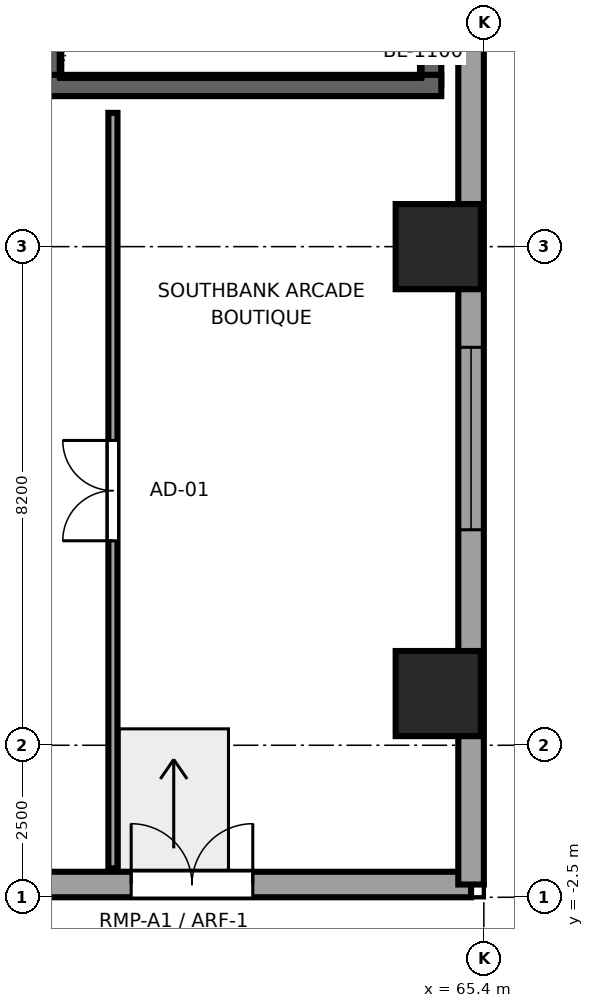
"""IFC4 building model, lengths in metres.
Left out: names, types, materials, properties, quantities, classifications, styles, units other than length and angle.
Written with IfcOpenShell. Run it as: python <this file> out.ifc"""

import sys

from ifc_helpers import new_model, si_unit, direction, frame, frame_2d, origin, origin_2d, place, context, subcontext, project, spatial, rectangle, extrude, source, transform, mapped, element, fill, save


model = new_model("IFC4")
c1 = context("Model", 3, precision=1e-05, world=origin(), true_north=direction((0.0, 1.0)))
c2 = subcontext(c1, "Body", "Model", "MODEL_VIEW")
j1 = project(units=[si_unit("LENGTHUNIT", "METRE"), si_unit("PLANEANGLEUNIT", "RADIAN")], contexts=[c1])
p1 = place(None, origin())
s1 = spatial("IfcSite", under=j1, at=p1, CompositionType="ELEMENT")
p2 = place(p1, origin())
s2 = spatial("IfcBuilding", under=s1, at=p2, CompositionType="ELEMENT")
p3 = place(p2, origin())
s3 = spatial("IfcBuildingStorey", under=s2, at=p3, CompositionType="ELEMENT", Elevation=0.0)
for number, where, z_axis, x_axis in (
    (1, (58.275, 10.85, 0.0), (0.0, 0.0, 1.0), (0.0, 1.0, 0.0)),
    (2, (64.525, 10.85, 0.0), (0.0, 0.0, 1.0), (0.0, 1.0, 0.0)),
):
    element("IfcWall", number, at=place(p3, frame(where, z_axis=z_axis, x_axis=x_axis)), inside=s3, PredefinedType="SHEAR", context=c2, shape_type="SweptSolid", body=[
        extrude(rectangle(XDim=29.0, YDim=0.35, at=frame_2d((14.5, 0.0))), origin(), (0.0, 0.0, 1.0), 1.25),
    ])
p4 = place(p3, frame((58.1, 10.85, 0.0), z_axis=(0.0, 0.0, 1.0), x_axis=(1.0, 0.0, 0.0)))
e3 = element("IfcWall", 3, at=p4, inside=s3, PredefinedType="SHEAR", context=c2, shape_type="SweptSolid", body=[
    extrude(rectangle(XDim=6.6, YDim=0.35, at=frame_2d((3.3, 0.0))), origin(), (0.0, 0.0, 1.0), 1.25),
])
m1 = source(origin(), c2, "Body", "SweptSolid", [
    extrude(rectangle(XDim=1.4, YDim=1.4, at=origin_2d()), origin(), (0.0, 0.0, 1.0), 6.0),
])
for number, where, z_axis, x_axis in (
    (4, (64.65, 0.85, 0.0), (0.0, 0.0, 1.0), (1.0, 0.0, 0.0)),
    (5, (64.65, 8.2, 0.0), (0.0, 0.0, 1.0), (1.0, 0.0, 0.0)),
):
    element("IfcColumn", number, at=place(p3, frame(where, z_axis=z_axis, x_axis=x_axis)), inside=s3, PredefinedType="COLUMN", context=c2, shape_type="MappedRepresentation", body=[
        mapped(m1, transform((0.0, 0.0, 0.0), x_axis=(1.0, 0.0, 0.0), y_axis=(0.0, 1.0, 0.0), z_axis=(0.0, 0.0, 1.0), scale=1.0)),
    ])
p5 = place(p3, frame((37.59, -2.29, 0.0), z_axis=(0.0, 0.0, 1.0), x_axis=(1.0, 0.0, 0.0)))
e6 = element("IfcWall", 6, at=p5, inside=s3, PredefinedType="SOLIDWALL", context=c2, shape_type="SweptSolid", body=[
    extrude(rectangle(XDim=27.6, YDim=0.42, at=frame_2d((13.8, 0.0))), origin(), (0.0, 0.0, 1.0), 5.74),
])
p6 = place(p5, frame((6.11, 0.0, 0.0), z_axis=(0.0, 0.0, 1.0), x_axis=(-1.0, 0.0, 0.0)))
e7 = element("IfcOpeningElement", 7, at=p6, cuts=e6, PredefinedType="OPENING", context=c2, shape_type="SweptSolid", body=[
    extrude(rectangle(XDim=2.0, YDim=2.25, at=frame_2d((1.0, 1.125))), frame((0.0, 0.22, 0.0), z_axis=(0.0, -1.0, 0.0), x_axis=(1.0, 0.0, 0.0)), (0.0, 0.0, 1.0), 0.44),
])
p7 = place(p5, frame((15.21, 0.0, 0.0), z_axis=(0.0, 0.0, 1.0), x_axis=(-1.0, 0.0, 0.0)))
e8 = element("IfcOpeningElement", 8, at=p7, cuts=e6, PredefinedType="OPENING", context=c2, shape_type="SweptSolid", body=[
    extrude(rectangle(XDim=2.0, YDim=2.25, at=frame_2d((1.0, 1.125))), frame((0.0, 0.22, 0.0), z_axis=(0.0, -1.0, 0.0), x_axis=(1.0, 0.0, 0.0)), (0.0, 0.0, 1.0), 0.44),
])
p8 = place(p5, frame((24.01, 0.0, 0.0), z_axis=(0.0, 0.0, 1.0), x_axis=(-1.0, 0.0, 0.0)))
e9 = element("IfcOpeningElement", 9, at=p8, cuts=e6, PredefinedType="OPENING", context=c2, shape_type="SweptSolid", body=[
    extrude(rectangle(XDim=2.0, YDim=2.25, at=frame_2d((1.0, 1.125))), frame((0.0, 0.22, 0.0), z_axis=(0.0, -1.0, 0.0), x_axis=(1.0, 0.0, 0.0)), (0.0, 0.0, 1.0), 0.44),
])
p9 = place(p3, frame((65.19, -2.29, 0.0), z_axis=(0.0, 0.0, 1.0), x_axis=(0.0, 1.0, 0.0)))
e10 = element("IfcWall", 10, at=p9, inside=s3, PredefinedType="SOLIDWALL", context=c2, shape_type="SweptSolid", body=[
    extrude(rectangle(XDim=50.58, YDim=0.42, at=frame_2d((25.29, 0.0))), origin(), (0.0, 0.0, 1.0), 5.74),
])
p10 = place(p9, frame((5.834, 0.0, 0.65)))
e11 = element("IfcOpeningElement", 11, at=p10, cuts=e10, PredefinedType="OPENING", context=c2, shape_type="SweptSolid", body=[
    extrude(rectangle(XDim=3.0, YDim=2.5, at=frame_2d((1.5, 1.25))), frame((0.0, 0.22, 0.0), z_axis=(0.0, -1.0, 0.0), x_axis=(1.0, 0.0, 0.0)), (0.0, 0.0, 1.0), 0.44),
])
p11 = place(p9, frame((14.262, 0.0, 0.65)))
e12 = element("IfcOpeningElement", 12, at=p11, cuts=e10, PredefinedType="OPENING", context=c2, shape_type="SweptSolid", body=[
    extrude(rectangle(XDim=3.0, YDim=2.5, at=frame_2d((1.5, 1.25))), frame((0.0, 0.22, 0.0), z_axis=(0.0, -1.0, 0.0), x_axis=(1.0, 0.0, 0.0)), (0.0, 0.0, 1.0), 0.44),
])
p12 = place(p9, frame((19.301, 0.0, 0.65)))
e13 = element("IfcOpeningElement", 13, at=p12, cuts=e10, PredefinedType="OPENING", context=c2, shape_type="SweptSolid", body=[
    extrude(rectangle(XDim=3.0, YDim=2.5, at=frame_2d((1.5, 1.25))), frame((0.0, 0.22, 0.0), z_axis=(0.0, -1.0, 0.0), x_axis=(1.0, 0.0, 0.0)), (0.0, 0.0, 1.0), 0.44),
])
p13 = place(p9, frame((22.74, 0.0, 0.65)))
e14 = element("IfcOpeningElement", 14, at=p13, cuts=e10, PredefinedType="OPENING", context=c2, shape_type="SweptSolid", body=[
    extrude(rectangle(XDim=3.0, YDim=2.5, at=frame_2d((1.5, 1.25))), frame((0.0, 0.22, 0.0), z_axis=(0.0, -1.0, 0.0), x_axis=(1.0, 0.0, 0.0)), (0.0, 0.0, 1.0), 0.44),
])
p14 = place(p9, frame((28.279, 0.0, 0.65)))
e15 = element("IfcOpeningElement", 15, at=p14, cuts=e10, PredefinedType="OPENING", context=c2, shape_type="SweptSolid", body=[
    extrude(rectangle(XDim=3.0, YDim=2.5, at=frame_2d((1.5, 1.25))), frame((0.0, 0.22, 0.0), z_axis=(0.0, -1.0, 0.0), x_axis=(1.0, 0.0, 0.0)), (0.0, 0.0, 1.0), 0.44),
])
p15 = place(p9, frame((37.257, 0.0, 0.65)))
e16 = element("IfcOpeningElement", 16, at=p15, cuts=e10, PredefinedType="OPENING", context=c2, shape_type="SweptSolid", body=[
    extrude(rectangle(XDim=3.0, YDim=2.5, at=frame_2d((1.5, 1.25))), frame((0.0, 0.22, 0.0), z_axis=(0.0, -1.0, 0.0), x_axis=(1.0, 0.0, 0.0)), (0.0, 0.0, 1.0), 0.44),
])
p16 = place(p3, frame((59.3, -2.025, 0.0), z_axis=(0.0, 0.0, 1.0), x_axis=(0.0, 1.0, 0.0)))
e17 = element("IfcWall", 17, at=p16, inside=s3, PredefinedType="PARTITIONING", context=c2, shape_type="SweptSolid", body=[
    extrude(rectangle(XDim=12.425, YDim=0.15, at=frame_2d((6.212, 0.0))), origin(), (0.0, 0.0, 1.0), 5.74),
])
p17 = place(p16, frame((5.387, 0.0, 0.0)))
e18 = element("IfcOpeningElement", 18, at=p17, cuts=e17, PredefinedType="OPENING", context=c2, shape_type="SweptSolid", body=[
    extrude(rectangle(XDim=1.65, YDim=2.15, at=frame_2d((0.825, 1.075))), frame((0.0, 0.085, 0.0), z_axis=(0.0, -1.0, 0.0), x_axis=(1.0, 0.0, 0.0)), (0.0, 0.0, 1.0), 0.17),
])
m2 = source(origin(), c2, "Body", "SweptSolid", [
    extrude(rectangle(XDim=2.0, YDim=2.25, at=frame_2d((1.0, 1.125))), frame((0.0, 0.025, 0.0), z_axis=(0.0, -1.0, 0.0), x_axis=(1.0, 0.0, 0.0)), (0.0, 0.0, 1.0), 0.05),
])
p18 = place(p8, origin())
e19 = element("IfcDoor", 19, at=p18, inside=s3, OperationType="DOUBLE_DOOR_SINGLE_SWING", PredefinedType="DOOR", context=c2, shape_type="MappedRepresentation", body=[
    mapped(m2, transform((0.0, 0.0, 0.0), x_axis=(1.0, 0.0, 0.0), y_axis=(0.0, 1.0, 0.0), z_axis=(0.0, 0.0, 1.0), scale=1.0)),
])
fill(e9, e19)
m3 = source(origin(), c2, "Body", "SweptSolid", [
    extrude(rectangle(XDim=3.0, YDim=2.5, at=frame_2d((1.5, 1.25))), frame((0.0, 0.09, 0.0), z_axis=(0.0, -1.0, 0.0), x_axis=(1.0, 0.0, 0.0)), (0.0, 0.0, 1.0), 0.06),
])
p19 = place(p10, origin())
e20 = element("IfcWindow", 20, at=p19, inside=s3, PartitioningType="TRIPLE_PANEL_HORIZONTAL", PredefinedType="WINDOW", context=c2, shape_type="MappedRepresentation", body=[
    mapped(m3, transform((0.0, 0.0, 0.0), x_axis=(1.0, 0.0, 0.0), y_axis=(0.0, 1.0, 0.0), z_axis=(0.0, 0.0, 1.0), scale=1.0)),
])
fill(e11, e20)
m4 = source(origin(), c2, "Body", "SweptSolid", [
    extrude(rectangle(XDim=1.65, YDim=2.15, at=frame_2d((0.825, 1.075))), frame((0.0, 0.025, 0.0), z_axis=(0.0, -1.0, 0.0), x_axis=(1.0, 0.0, 0.0)), (0.0, 0.0, 1.0), 0.05),
])
p20 = place(p17, origin())
e21 = element("IfcDoor", 21, at=p20, inside=s3, OperationType="DOUBLE_DOOR_SINGLE_SWING", PredefinedType="DOOR", context=c2, shape_type="MappedRepresentation", body=[
    mapped(m4, transform((0.0, 0.0, 0.0), x_axis=(1.0, 0.0, 0.0), y_axis=(0.0, 1.0, 0.0), z_axis=(0.0, 0.0, 1.0), scale=1.0)),
])
fill(e18, e21)
save(model, sys.argv[1])
